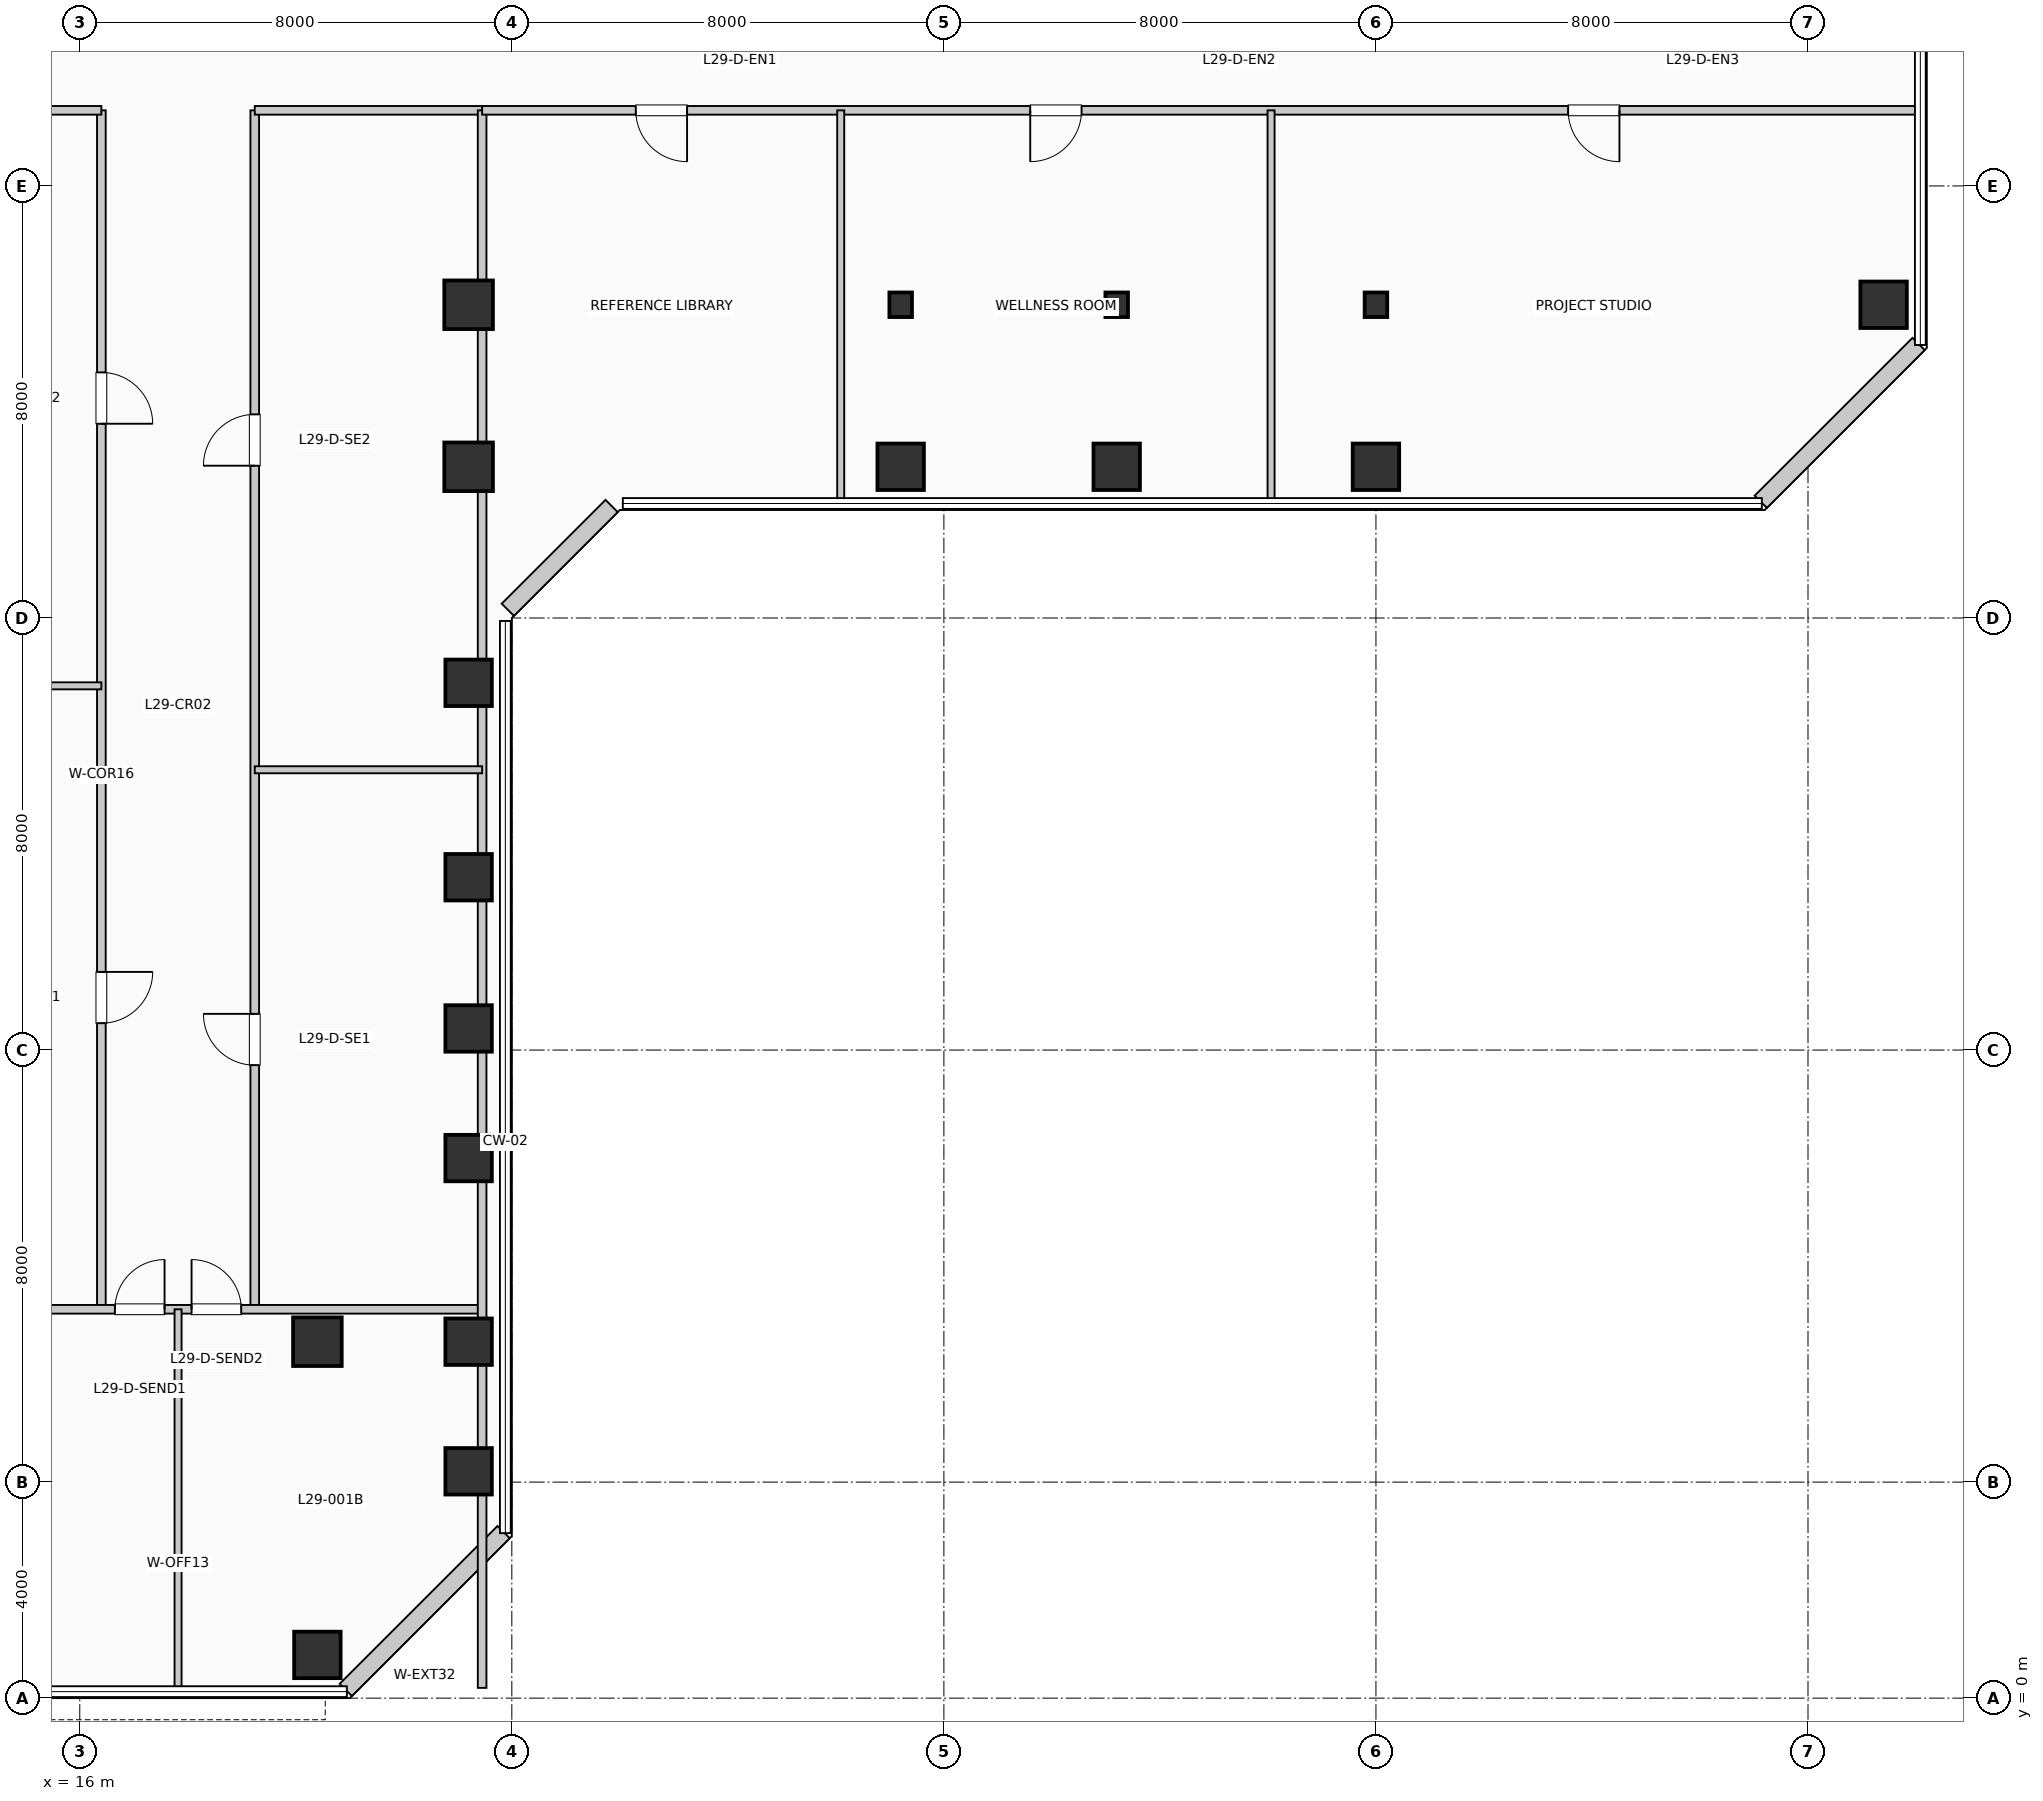
"""IFC4 building model, lengths in metres.
Left out: names, types, materials, properties, quantities, classifications, styles, units other than length and angle.
Written with IfcOpenShell. Run it as: python <this file> out.ifc"""

import sys

from ifc_helpers import new_model, si_unit, direction, frame, frame_2d, origin, origin_2d, place, context, subcontext, project, spatial, rectangle, i_section, extrude, element, fill, save


model = new_model("IFC4")
c1 = context("Model", 3, precision=1e-05, world=origin(), true_north=direction((0.0, 1.0)))
c2 = subcontext(c1, "Body", "Model", "MODEL_VIEW")
j1 = project(units=[si_unit("LENGTHUNIT", "METRE"), si_unit("PLANEANGLEUNIT", "RADIAN")], contexts=[c1])
p1 = place(None, origin())
s1 = spatial("IfcSite", under=j1, at=p1, CompositionType="ELEMENT")
p2 = place(p1, origin())
s2 = spatial("IfcBuilding", under=s1, at=p2, CompositionType="ELEMENT")
p3 = place(p2, frame((0.0, 0.0, 122.43)))
s3 = spatial("IfcBuildingStorey", under=s2, at=p3, CompositionType="ELEMENT", Elevation=122.43)
p4 = place(p3, frame((20.4, 0.8, 0.0), z_axis=(0.0, 0.0, 1.0), x_axis=(1.0, 0.0, 0.0)))
e1 = element("IfcColumn", 1, at=p4, inside=s3, PredefinedType="COLUMN", context=c2, shape_type="SweptSolid", body=[
    extrude(rectangle(XDim=0.86, YDim=0.86, at=origin_2d()), origin(), (0.0, 0.0, 1.0), 3.96),
])
p5 = place(p3, frame((20.4, 6.6, 0.0), z_axis=(0.0, 0.0, 1.0), x_axis=(1.0, 0.0, 0.0)))
e2 = element("IfcColumn", 2, at=p5, inside=s3, PredefinedType="COLUMN", context=c2, shape_type="SweptSolid", body=[
    extrude(rectangle(XDim=0.9, YDim=0.9, at=origin_2d()), origin(), (0.0, 0.0, 1.0), 3.96),
])
for number, where, z_axis, x_axis in (
    (3, (23.2, 4.2, 0.0), (0.0, 0.0, 1.0), (1.0, 0.0, 0.0)),
    (4, (23.2, 6.6, 0.0), (0.0, 0.0, 1.0), (1.0, 0.0, 0.0)),
    (5, (23.2, 10.0, 0.0), (0.0, 0.0, 1.0), (1.0, 0.0, 0.0)),
    (6, (23.2, 12.4, 0.0), (0.0, 0.0, 1.0), (1.0, 0.0, 0.0)),
    (7, (23.2, 15.2, 0.0), (0.0, 0.0, 1.0), (1.0, 0.0, 0.0)),
    (8, (23.2, 18.8, 0.0), (0.0, 0.0, 1.0), (1.0, 0.0, 0.0)),
):
    element("IfcColumn", number, at=place(p3, frame(where, z_axis=z_axis, x_axis=x_axis)), inside=s3, PredefinedType="COLUMN", context=c2, shape_type="SweptSolid", body=[
        extrude(rectangle(XDim=0.86, YDim=0.86, at=origin_2d()), origin(), (0.0, 0.0, 1.0), 3.96),
    ])
for number, where, z_axis, x_axis in (
    (9, (23.2, 22.8, 0.0), (0.0, 0.0, 1.0), (1.0, 0.0, 0.0)),
    (10, (23.2, 25.8, 0.0), (0.0, 0.0, 1.0), (1.0, 0.0, 0.0)),
):
    element("IfcColumn", number, at=place(p3, frame(where, z_axis=z_axis, x_axis=x_axis)), inside=s3, PredefinedType="COLUMN", context=c2, shape_type="SweptSolid", body=[
        extrude(rectangle(XDim=0.9, YDim=0.9, at=origin_2d()), origin(), (0.0, 0.0, 1.0), 3.96),
    ])
p6 = place(p3, frame((31.2, 22.8, 0.0), z_axis=(0.0, 0.0, 1.0), x_axis=(1.0, 0.0, 0.0)))
e11 = element("IfcColumn", 11, at=p6, inside=s3, PredefinedType="COLUMN", context=c2, shape_type="SweptSolid", body=[
    extrude(rectangle(XDim=0.86, YDim=0.86, at=origin_2d()), origin(), (0.0, 0.0, 1.0), 3.96),
])
p7 = place(p3, frame((31.2, 25.8, 0.0), z_axis=(0.0, 0.0, 1.0), x_axis=(1.0, 0.0, 0.0)))
e12 = element("IfcColumn", 12, at=p7, inside=s3, PredefinedType="COLUMN", context=c2, shape_type="SweptSolid", body=[
    extrude(i_section(OverallWidth=0.418, OverallDepth=0.455, WebThickness=0.032, FlangeThickness=0.051, at=origin_2d()), origin(), (0.0, 0.0, 1.0), 3.96),
])
p8 = place(p3, frame((35.2, 22.8, 0.0), z_axis=(0.0, 0.0, 1.0), x_axis=(1.0, 0.0, 0.0)))
e13 = element("IfcColumn", 13, at=p8, inside=s3, PredefinedType="COLUMN", context=c2, shape_type="SweptSolid", body=[
    extrude(rectangle(XDim=0.86, YDim=0.86, at=origin_2d()), origin(), (0.0, 0.0, 1.0), 3.96),
])
p9 = place(p3, frame((35.2, 25.8, 0.0), z_axis=(0.0, 0.0, 1.0), x_axis=(1.0, 0.0, 0.0)))
e14 = element("IfcColumn", 14, at=p9, inside=s3, PredefinedType="COLUMN", context=c2, shape_type="SweptSolid", body=[
    extrude(i_section(OverallWidth=0.418, OverallDepth=0.455, WebThickness=0.032, FlangeThickness=0.051, at=origin_2d()), origin(), (0.0, 0.0, 1.0), 3.96),
])
p10 = place(p3, frame((40.0, 22.8, 0.0), z_axis=(0.0, 0.0, 1.0), x_axis=(1.0, 0.0, 0.0)))
e15 = element("IfcColumn", 15, at=p10, inside=s3, PredefinedType="COLUMN", context=c2, shape_type="SweptSolid", body=[
    extrude(rectangle(XDim=0.86, YDim=0.86, at=origin_2d()), origin(), (0.0, 0.0, 1.0), 3.96),
])
p11 = place(p3, frame((40.0, 25.8, 0.0), z_axis=(0.0, 0.0, 1.0), x_axis=(1.0, 0.0, 0.0)))
e16 = element("IfcColumn", 16, at=p11, inside=s3, PredefinedType="COLUMN", context=c2, shape_type="SweptSolid", body=[
    extrude(i_section(OverallWidth=0.418, OverallDepth=0.455, WebThickness=0.032, FlangeThickness=0.051, at=origin_2d()), origin(), (0.0, 0.0, 1.0), 3.96),
])
p12 = place(p3, frame((49.4, 25.8, 0.0), z_axis=(0.0, 0.0, 1.0), x_axis=(1.0, 0.0, 0.0)))
e17 = element("IfcColumn", 17, at=p12, inside=s3, PredefinedType="COLUMN", context=c2, shape_type="SweptSolid", body=[
    extrude(rectangle(XDim=0.86, YDim=0.86, at=origin_2d()), origin(), (0.0, 0.0, 1.0), 3.96),
])
p13 = place(p3, frame((20.926, 0.152, 0.0), z_axis=(0.0, 0.0, 1.0), x_axis=(0.707106781187, 0.707106781187, 0.0)))
e18 = element("IfcWall", 18, at=p13, inside=s3, PredefinedType="SOLIDWALL", context=c2, shape_type="SweptSolid", body=[
    extrude(rectangle(XDim=4.133, YDim=0.32, at=frame_2d((2.066, 0.0))), origin(), (0.0, 0.0, 1.0), 3.71),
])
p14 = place(p3, frame((23.926, 20.152, 0.0), z_axis=(0.0, 0.0, 1.0), x_axis=(0.707106781187, 0.707106781187, 0.0)))
e19 = element("IfcWall", 19, at=p14, inside=s3, PredefinedType="SOLIDWALL", context=c2, shape_type="SweptSolid", body=[
    extrude(rectangle(XDim=2.718, YDim=0.32, at=frame_2d((1.359, 0.0))), origin(), (0.0, 0.0, 1.0), 3.71),
])
p15 = place(p3, frame((47.126, 22.152, 0.0), z_axis=(0.0, 0.0, 1.0), x_axis=(0.707136318428, 0.707077242712, 0.0)))
e20 = element("IfcWall", 20, at=p15, inside=s3, PredefinedType="SOLIDWALL", context=c2, shape_type="SweptSolid", body=[
    extrude(rectangle(XDim=4.133, YDim=0.32, at=frame_2d((2.066, 0.0))), origin(), (0.0, 0.0, 1.0), 3.71),
])
p16 = place(p3, frame((16.4, 7.2, 0.0), z_axis=(0.0, 0.0, 1.0), x_axis=(0.0, 1.0, 0.0)))
e21 = element("IfcWall", 21, at=p16, inside=s3, PredefinedType="PARTITIONING", context=c2, shape_type="SweptSolid", body=[
    extrude(rectangle(XDim=22.2, YDim=0.16, at=frame_2d((11.1, 0.0))), origin(), (0.0, 0.0, 1.0), 3.71),
])
p17 = place(p16, frame((6.247, 0.0, 0.0), z_axis=(0.0, 0.0, 1.0), x_axis=(-1.0, 0.0, 0.0)))
e22 = element("IfcOpeningElement", 22, at=p17, cuts=e21, PredefinedType="OPENING", context=c2, shape_type="SweptSolid", body=[
    extrude(rectangle(XDim=0.95, YDim=2.15, at=frame_2d((0.475, 1.075))), frame((0.0, 0.09, 0.0), z_axis=(0.0, -1.0, 0.0), x_axis=(1.0, 0.0, 0.0)), (0.0, 0.0, 1.0), 0.18),
])
p18 = place(p16, frame((17.347, 0.0, 0.0), z_axis=(0.0, 0.0, 1.0), x_axis=(-1.0, 0.0, 0.0)))
e23 = element("IfcOpeningElement", 23, at=p18, cuts=e21, PredefinedType="OPENING", context=c2, shape_type="SweptSolid", body=[
    extrude(rectangle(XDim=0.95, YDim=2.15, at=frame_2d((0.475, 1.075))), frame((0.0, 0.09, 0.0), z_axis=(0.0, -1.0, 0.0), x_axis=(1.0, 0.0, 0.0)), (0.0, 0.0, 1.0), 0.18),
])
p19 = place(p3, frame((19.24, 7.2, 0.0), z_axis=(0.0, 0.0, 1.0), x_axis=(0.0, 1.0, 0.0)))
e24 = element("IfcWall", 24, at=p19, inside=s3, PredefinedType="PARTITIONING", context=c2, shape_type="SweptSolid", body=[
    extrude(rectangle(XDim=22.2, YDim=0.16, at=frame_2d((11.1, 0.0))), origin(), (0.0, 0.0, 1.0), 3.71),
])
p20 = place(p19, frame((4.52, 0.0, 0.0)))
e25 = element("IfcOpeningElement", 25, at=p20, cuts=e24, PredefinedType="OPENING", context=c2, shape_type="SweptSolid", body=[
    extrude(rectangle(XDim=0.95, YDim=2.15, at=frame_2d((0.475, 1.075))), frame((0.0, 0.09, 0.0), z_axis=(0.0, -1.0, 0.0), x_axis=(1.0, 0.0, 0.0)), (0.0, 0.0, 1.0), 0.18),
])
p21 = place(p19, frame((15.62, 0.0, 0.0)))
e26 = element("IfcOpeningElement", 26, at=p21, cuts=e24, PredefinedType="OPENING", context=c2, shape_type="SweptSolid", body=[
    extrude(rectangle(XDim=0.95, YDim=2.15, at=frame_2d((0.475, 1.075))), frame((0.0, 0.09, 0.0), z_axis=(0.0, -1.0, 0.0), x_axis=(1.0, 0.0, 0.0)), (0.0, 0.0, 1.0), 0.18),
])
p22 = place(p3, frame((0.19, 7.2, 0.0), z_axis=(0.0, 0.0, 1.0), x_axis=(1.0, 0.0, 0.0)))
e27 = element("IfcWall", 27, at=p22, inside=s3, PredefinedType="PARTITIONING", context=c2, shape_type="SweptSolid", body=[
    extrude(rectangle(XDim=23.26, YDim=0.16, at=frame_2d((11.63, 0.0))), origin(), (0.0, 0.0, 1.0), 3.71),
])
p23 = place(p22, frame((16.46, 0.0, 0.0)))
e28 = element("IfcOpeningElement", 28, at=p23, cuts=e27, PredefinedType="OPENING", context=c2, shape_type="SweptSolid", body=[
    extrude(rectangle(XDim=0.92, YDim=2.1, at=frame_2d((0.46, 1.05))), frame((0.0, 0.09, 0.0), z_axis=(0.0, -1.0, 0.0), x_axis=(1.0, 0.0, 0.0)), (0.0, 0.0, 1.0), 0.18),
])
p24 = place(p22, frame((17.88, 0.0, 0.0)))
e29 = element("IfcOpeningElement", 29, at=p24, cuts=e27, PredefinedType="OPENING", context=c2, shape_type="SweptSolid", body=[
    extrude(rectangle(XDim=0.92, YDim=2.1, at=frame_2d((0.46, 1.05))), frame((0.0, 0.09, 0.0), z_axis=(0.0, -1.0, 0.0), x_axis=(1.0, 0.0, 0.0)), (0.0, 0.0, 1.0), 0.18),
])
p25 = place(p3, frame((0.19, 29.4, 0.0), z_axis=(0.0, 0.0, 1.0), x_axis=(1.0, 0.0, 0.0)))
e30 = element("IfcWall", 30, at=p25, inside=s3, PredefinedType="PARTITIONING", context=c2, shape_type="SweptSolid", body=[
    extrude(rectangle(XDim=16.21, YDim=0.16, at=frame_2d((8.105, 0.0))), origin(), (0.0, 0.0, 1.0), 3.365),
])
p26 = place(p3, frame((19.24, 29.4, 0.0), z_axis=(0.0, 0.0, 1.0), x_axis=(1.0, 0.0, 0.0)))
e31 = element("IfcWall", 31, at=p26, inside=s3, PredefinedType="PARTITIONING", context=c2, shape_type="SweptSolid", body=[
    extrude(rectangle(XDim=4.21, YDim=0.16, at=frame_2d((2.105, 0.0))), origin(), (0.0, 0.0, 1.0), 3.71),
])
p27 = place(p3, frame((23.45, 0.19, 0.0), z_axis=(0.0, 0.0, 1.0), x_axis=(0.0, 1.0, 0.0)))
e32 = element("IfcWall", 32, at=p27, inside=s3, PredefinedType="PARTITIONING", context=c2, shape_type="SweptSolid", body=[
    extrude(rectangle(XDim=29.21, YDim=0.16, at=frame_2d((14.605, 0.0))), origin(), (0.0, 0.0, 1.0), 3.045),
])
p28 = place(p3, frame((17.82, 0.19, 0.0), z_axis=(0.0, 0.0, 1.0), x_axis=(0.0, 1.0, 0.0)))
e33 = element("IfcWall", 33, at=p28, inside=s3, PredefinedType="PARTITIONING", context=c2, shape_type="SweptSolid", body=[
    extrude(rectangle(XDim=7.01, YDim=0.13, at=frame_2d((3.505, 0.0))), origin(), (0.0, 0.0, 1.0), 3.71),
])
p29 = place(p3, frame((0.19, 18.744, 0.0), z_axis=(0.0, 0.0, 1.0), x_axis=(1.0, 0.0, 0.0)))
e34 = element("IfcWall", 34, at=p29, inside=s3, PredefinedType="PARTITIONING", context=c2, shape_type="SweptSolid", body=[
    extrude(rectangle(XDim=16.21, YDim=0.13, at=frame_2d((8.105, 0.0))), origin(), (0.0, 0.0, 1.0), 3.045),
])
p30 = place(p3, frame((19.24, 17.19, 0.0), z_axis=(0.0, 0.0, 1.0), x_axis=(1.0, 0.0, 0.0)))
e35 = element("IfcWall", 35, at=p30, inside=s3, PredefinedType="PARTITIONING", context=c2, shape_type="SweptSolid", body=[
    extrude(rectangle(XDim=4.21, YDim=0.13, at=frame_2d((2.105, 0.0))), origin(), (0.0, 0.0, 1.0), 3.71),
])
p31 = place(p3, frame((23.45, 29.4, 0.0), z_axis=(0.0, 0.0, 1.0), x_axis=(1.0, 0.0, 0.0)))
e36 = element("IfcWall", 36, at=p31, inside=s3, PredefinedType="PARTITIONING", context=c2, shape_type="SweptSolid", body=[
    extrude(rectangle(XDim=26.56, YDim=0.16, at=frame_2d((13.28, 0.0))), origin(), (0.0, 0.0, 1.0), 3.365),
])
p32 = place(p31, frame((3.795, 0.0, 0.0), z_axis=(0.0, 0.0, 1.0), x_axis=(-1.0, 0.0, 0.0)))
e37 = element("IfcOpeningElement", 37, at=p32, cuts=e36, PredefinedType="OPENING", context=c2, shape_type="SweptSolid", body=[
    extrude(rectangle(XDim=0.95, YDim=2.15, at=frame_2d((0.475, 1.075))), frame((0.0, 0.09, 0.0), z_axis=(0.0, -1.0, 0.0), x_axis=(1.0, 0.0, 0.0)), (0.0, 0.0, 1.0), 0.18),
])
p33 = place(p31, frame((11.099, 0.0, 0.0), z_axis=(0.0, 0.0, 1.0), x_axis=(-1.0, 0.0, 0.0)))
e38 = element("IfcOpeningElement", 38, at=p33, cuts=e36, PredefinedType="OPENING", context=c2, shape_type="SweptSolid", body=[
    extrude(rectangle(XDim=0.95, YDim=2.15, at=frame_2d((0.475, 1.075))), frame((0.0, 0.09, 0.0), z_axis=(0.0, -1.0, 0.0), x_axis=(1.0, 0.0, 0.0)), (0.0, 0.0, 1.0), 0.18),
])
p34 = place(p31, frame((21.059, 0.0, 0.0), z_axis=(0.0, 0.0, 1.0), x_axis=(-1.0, 0.0, 0.0)))
e39 = element("IfcOpeningElement", 39, at=p34, cuts=e36, PredefinedType="OPENING", context=c2, shape_type="SweptSolid", body=[
    extrude(rectangle(XDim=0.95, YDim=2.15, at=frame_2d((0.475, 1.075))), frame((0.0, 0.09, 0.0), z_axis=(0.0, -1.0, 0.0), x_axis=(1.0, 0.0, 0.0)), (0.0, 0.0, 1.0), 0.18),
])
for number, where, z_axis, x_axis in (
    (40, (30.09, 22.19, 0.0), (0.0, 0.0, 1.0), (0.0, 1.0, 0.0)),
    (41, (38.058, 22.19, 0.0), (0.0, 0.0, 1.0), (0.0, 1.0, 0.0)),
):
    element("IfcWall", number, at=place(p3, frame(where, z_axis=z_axis, x_axis=x_axis)), inside=s3, PredefinedType="PARTITIONING", context=c2, shape_type="SweptSolid", body=[
        extrude(rectangle(XDim=7.21, YDim=0.13, at=frame_2d((3.605, 0.0))), origin(), (0.0, 0.0, 1.0), 3.71),
    ])
p35 = place(p23, origin())
e42 = element("IfcDoor", 42, at=p35, inside=s3, OperationType="SINGLE_SWING_RIGHT", PredefinedType="DOOR", context=c2, shape_type="SweptSolid", body=[
    extrude(rectangle(XDim=0.92, YDim=2.1, at=frame_2d((0.46, 1.05))), frame((0.0, 0.025, 0.0), z_axis=(0.0, -1.0, 0.0), x_axis=(1.0, 0.0, 0.0)), (0.0, 0.0, 1.0), 0.05),
])
fill(e28, e42)
p36 = place(p24, origin())
e43 = element("IfcDoor", 43, at=p36, inside=s3, OperationType="SINGLE_SWING_LEFT", PredefinedType="DOOR", context=c2, shape_type="SweptSolid", body=[
    extrude(rectangle(XDim=0.92, YDim=2.1, at=frame_2d((0.46, 1.05))), frame((0.0, 0.025, 0.0), z_axis=(0.0, -1.0, 0.0), x_axis=(1.0, 0.0, 0.0)), (0.0, 0.0, 1.0), 0.05),
])
fill(e29, e43)
p37 = place(p17, origin())
e44 = element("IfcDoor", 44, at=p37, inside=s3, OperationType="SINGLE_SWING_RIGHT", PredefinedType="DOOR", context=c2, shape_type="SweptSolid", body=[
    extrude(rectangle(XDim=0.95, YDim=2.15, at=frame_2d((0.475, 1.075))), frame((0.0, 0.025, 0.0), z_axis=(0.0, -1.0, 0.0), x_axis=(1.0, 0.0, 0.0)), (0.0, 0.0, 1.0), 0.05),
])
fill(e22, e44)
p38 = place(p18, origin())
e45 = element("IfcDoor", 45, at=p38, inside=s3, OperationType="SINGLE_SWING_LEFT", PredefinedType="DOOR", context=c2, shape_type="SweptSolid", body=[
    extrude(rectangle(XDim=0.95, YDim=2.15, at=frame_2d((0.475, 1.075))), frame((0.0, 0.025, 0.0), z_axis=(0.0, -1.0, 0.0), x_axis=(1.0, 0.0, 0.0)), (0.0, 0.0, 1.0), 0.05),
])
fill(e23, e45)
p39 = place(p20, origin())
e46 = element("IfcDoor", 46, at=p39, inside=s3, OperationType="SINGLE_SWING_RIGHT", PredefinedType="DOOR", context=c2, shape_type="SweptSolid", body=[
    extrude(rectangle(XDim=0.95, YDim=2.15, at=frame_2d((0.475, 1.075))), frame((0.0, 0.025, 0.0), z_axis=(0.0, -1.0, 0.0), x_axis=(1.0, 0.0, 0.0)), (0.0, 0.0, 1.0), 0.05),
])
fill(e25, e46)
p40 = place(p21, origin())
e47 = element("IfcDoor", 47, at=p40, inside=s3, OperationType="SINGLE_SWING_LEFT", PredefinedType="DOOR", context=c2, shape_type="SweptSolid", body=[
    extrude(rectangle(XDim=0.95, YDim=2.15, at=frame_2d((0.475, 1.075))), frame((0.0, 0.025, 0.0), z_axis=(0.0, -1.0, 0.0), x_axis=(1.0, 0.0, 0.0)), (0.0, 0.0, 1.0), 0.05),
])
fill(e26, e47)
p41 = place(p32, origin())
e48 = element("IfcDoor", 48, at=p41, inside=s3, OperationType="SINGLE_SWING_RIGHT", PredefinedType="DOOR", context=c2, shape_type="SweptSolid", body=[
    extrude(rectangle(XDim=0.95, YDim=2.15, at=frame_2d((0.475, 1.075))), frame((0.0, 0.025, 0.0), z_axis=(0.0, -1.0, 0.0), x_axis=(1.0, 0.0, 0.0)), (0.0, 0.0, 1.0), 0.05),
])
fill(e37, e48)
p42 = place(p33, origin())
e49 = element("IfcDoor", 49, at=p42, inside=s3, OperationType="SINGLE_SWING_LEFT", PredefinedType="DOOR", context=c2, shape_type="SweptSolid", body=[
    extrude(rectangle(XDim=0.95, YDim=2.15, at=frame_2d((0.475, 1.075))), frame((0.0, 0.025, 0.0), z_axis=(0.0, -1.0, 0.0), x_axis=(1.0, 0.0, 0.0)), (0.0, 0.0, 1.0), 0.05),
])
fill(e38, e49)
p43 = place(p34, origin())
e50 = element("IfcDoor", 50, at=p43, inside=s3, OperationType="SINGLE_SWING_RIGHT", PredefinedType="DOOR", context=c2, shape_type="SweptSolid", body=[
    extrude(rectangle(XDim=0.95, YDim=2.15, at=frame_2d((0.475, 1.075))), frame((0.0, 0.025, 0.0), z_axis=(0.0, -1.0, 0.0), x_axis=(1.0, 0.0, 0.0)), (0.0, 0.0, 1.0), 0.05),
])
fill(e39, e50)
save(model, sys.argv[1])
